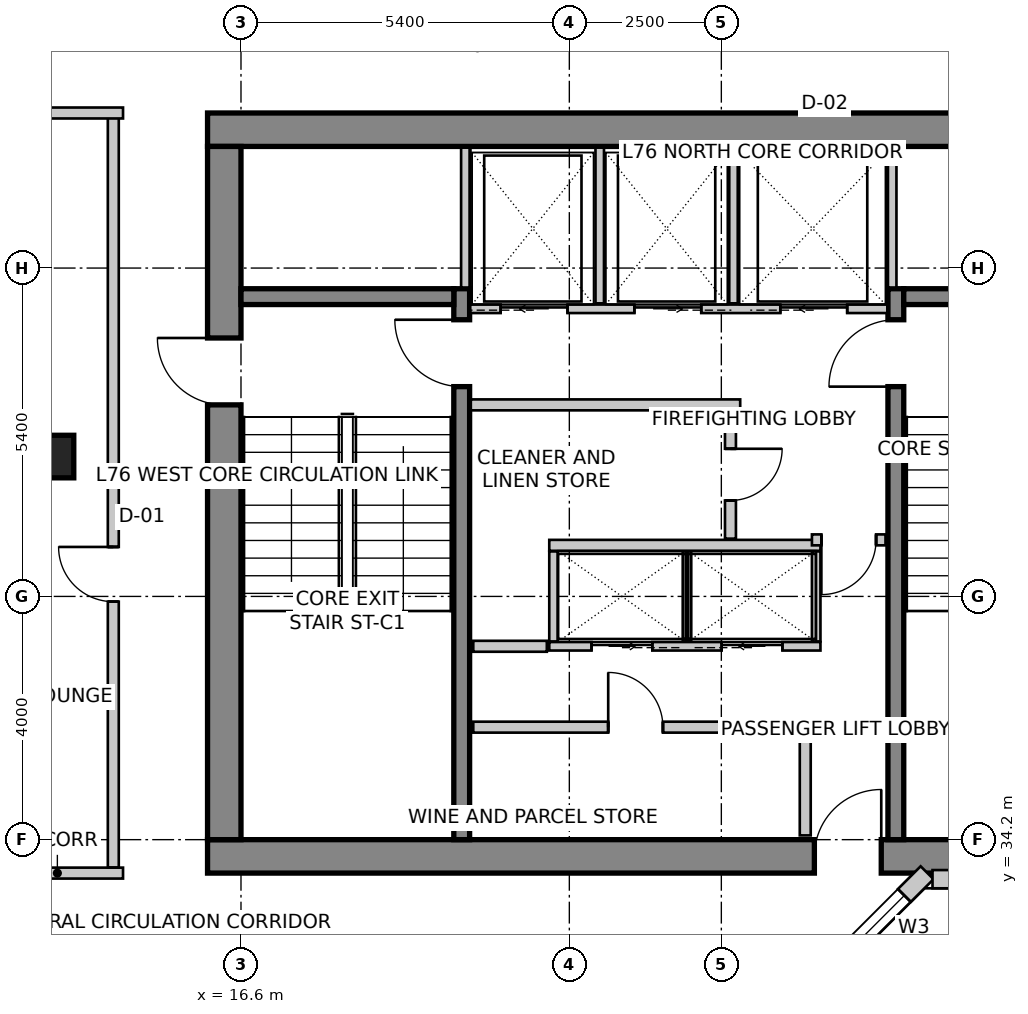
"""IFC4 building model, lengths in metres.
Left out: names, types, materials, properties, quantities, classifications, styles, units other than length and angle.
Written with IfcOpenShell. Run it as: python <this file> out.ifc"""

import sys

from ifc_helpers import new_model, si_unit, direction, frame, frame_2d, origin, origin_2d, place, context, subcontext, project, spatial, rectangle, extrude, source, transform, mapped, element, fill, save


model = new_model("IFC4")
c1 = context("Model", 3, precision=1e-05, world=origin(), true_north=direction((0.0, 1.0)))
c2 = subcontext(c1, "Body", "Model", "MODEL_VIEW")
j1 = project(units=[si_unit("LENGTHUNIT", "METRE"), si_unit("PLANEANGLEUNIT", "RADIAN")], contexts=[c1])
p1 = place(None, origin())
s1 = spatial("IfcSite", under=j1, at=p1, CompositionType="ELEMENT")
p2 = place(p1, origin())
s2 = spatial("IfcBuilding", under=s1, at=p2, CompositionType="ELEMENT")
p3 = place(p2, frame((0.0, 0.0, 296.5)))
s3 = spatial("IfcBuildingStorey", under=s2, at=p3, CompositionType="ELEMENT", Elevation=296.5)
p4 = place(p3, frame((16.05, 45.875, 0.0), z_axis=(0.0, 0.0, 1.0), x_axis=(1.0, 0.0, 0.0)))
e1 = element("IfcWall", 1, at=p4, inside=s3, PredefinedType="SHEAR", context=c2, shape_type="SweptSolid", body=[
    extrude(rectangle(XDim=15.5, YDim=0.55, at=frame_2d((7.75, 0.0))), origin(), (0.0, 0.0, 1.0), 4.0),
])
p5 = place(p3, frame((16.05, 33.925, 0.0), z_axis=(0.0, 0.0, 1.0), x_axis=(1.0, 0.0, 0.0)))
e2 = element("IfcWall", 2, at=p5, inside=s3, PredefinedType="SHEAR", context=c2, shape_type="SweptSolid", body=[
    extrude(rectangle(XDim=15.5, YDim=0.55, at=frame_2d((7.75, 0.0))), origin(), (0.0, 0.0, 1.0), 4.0),
])
m1 = source(origin(), c2, "Body", "SweptSolid", [
    extrude(rectangle(XDim=1.1, YDim=2.15, at=frame_2d((0.55, 1.075))), frame((0.0, 0.285, 0.0), z_axis=(0.0, -1.0, 0.0), x_axis=(1.0, 0.0, 0.0)), (0.0, 0.0, 1.0), 0.57),
])
p6 = place(p5, frame((9.98, 0.0, 0.0)))
e3 = element("IfcOpeningElement", 3, at=p6, cuts=e2, PredefinedType="OPENING", context=c2, shape_type="MappedRepresentation", body=[
    mapped(m1, transform((0.0, 0.0, 0.0), scale=1.0)),
])
p7 = place(p3, frame((16.325, 34.2, 0.0), z_axis=(0.0, 0.0, 1.0), x_axis=(0.0, 1.0, 0.0)))
e4 = element("IfcWall", 4, at=p7, inside=s3, PredefinedType="SHEAR", context=c2, shape_type="SweptSolid", body=[
    extrude(rectangle(XDim=11.4, YDim=0.55, at=frame_2d((5.7, 0.0))), origin(), (0.0, 0.0, 1.0), 4.0),
])
p8 = place(p7, frame((7.15, 0.0, 0.0)))
e5 = element("IfcOpeningElement", 5, at=p8, cuts=e4, PredefinedType="OPENING", context=c2, shape_type="MappedRepresentation", body=[
    mapped(m1, transform((0.0, 0.0, 0.0), scale=1.0)),
])
p9 = place(p3, frame((20.23, 34.2, 0.0), z_axis=(0.0, 0.0, 1.0), x_axis=(0.0, 1.0, 0.0)))
e6 = element("IfcWall", 6, at=p9, inside=s3, PredefinedType="SHEAR", context=c2, shape_type="SweptSolid", body=[
    extrude(rectangle(XDim=9.06, YDim=0.26, at=frame_2d((4.53, 0.0))), origin(), (0.0, 0.0, 1.0), 4.0),
])
m2 = source(origin(), c2, "Body", "SweptSolid", [
    extrude(rectangle(XDim=1.1, YDim=2.15, at=frame_2d((0.55, 1.075))), frame((0.0, 0.14, 0.0), z_axis=(0.0, -1.0, 0.0), x_axis=(1.0, 0.0, 0.0)), (0.0, 0.0, 1.0), 0.28),
])
p10 = place(p9, frame((7.45, 0.0, 0.0)))
e7 = element("IfcOpeningElement", 7, at=p10, cuts=e6, PredefinedType="OPENING", context=c2, shape_type="MappedRepresentation", body=[
    mapped(m2, transform((0.0, 0.0, 0.0), scale=1.0)),
])
p11 = place(p3, frame((27.37, 34.2, 0.0), z_axis=(0.0, 0.0, 1.0), x_axis=(0.0, 1.0, 0.0)))
e8 = element("IfcWall", 8, at=p11, inside=s3, PredefinedType="SHEAR", context=c2, shape_type="SweptSolid", body=[
    extrude(rectangle(XDim=9.06, YDim=0.26, at=frame_2d((4.53, 0.0))), origin(), (0.0, 0.0, 1.0), 4.0),
])
p12 = place(p11, frame((7.45, 0.0, 0.0)))
e9 = element("IfcOpeningElement", 9, at=p12, cuts=e8, PredefinedType="OPENING", context=c2, shape_type="MappedRepresentation", body=[
    mapped(m2, transform((0.0, 0.0, 0.0), scale=1.0)),
])
for number, where, z_axis, x_axis in (
    (10, (16.6, 43.13, 0.0), (0.0, 0.0, 1.0), (1.0, 0.0, 0.0)),
    (11, (27.5, 43.13, 0.0), (0.0, 0.0, 1.0), (1.0, 0.0, 0.0)),
):
    element("IfcWall", number, at=place(p3, frame(where, z_axis=z_axis, x_axis=x_axis)), inside=s3, PredefinedType="SHEAR", context=c2, shape_type="SweptSolid", body=[
        extrude(rectangle(XDim=3.5, YDim=0.26, at=frame_2d((1.75, 0.0))), origin(), (0.0, 0.0, 1.0), 4.0),
    ])
m3 = source(origin(), c2, "Body", "SweptSolid", [
    extrude(rectangle(XDim=0.7, YDim=0.7, at=origin_2d()), origin(), (0.0, 0.0, 1.0), 4.0),
])
p13 = place(p3, frame((13.5, 40.5, 0.0), z_axis=(0.0, 0.0, 1.0), x_axis=(1.0, 0.0, 0.0)))
e12 = element("IfcColumn", 12, at=p13, inside=s3, PredefinedType="COLUMN", context=c2, shape_type="MappedRepresentation", body=[
    mapped(m3, transform((0.0, 0.0, 0.0), scale=1.0)),
])
p14 = place(p3, frame((25.828, 31.6, 0.0), z_axis=(0.0, 0.0, 1.0), x_axis=(0.707106781187, 0.707106781187, 0.0)))
e13 = element("IfcWall", 13, at=p14, inside=s3, PredefinedType="SOLIDWALL", context=c2, shape_type="SweptSolid", body=[
    extrude(rectangle(XDim=2.907, YDim=0.3, at=frame_2d((1.454, 0.0))), origin(), (0.0, 0.0, 1.0), 3.75),
])
m4 = source(origin(), c2, "Body", "SweptSolid", [
    extrude(rectangle(XDim=1.5, YDim=1.8, at=frame_2d((0.75, 0.9))), frame((0.0, 0.16, 0.0), z_axis=(0.0, -1.0, 0.0), x_axis=(1.0, 0.0, 0.0)), (0.0, 0.0, 1.0), 0.32),
])
p15 = place(p14, frame((0.879, 0.0, 0.85)))
e14 = element("IfcOpeningElement", 14, at=p15, cuts=e13, PredefinedType="OPENING", context=c2, shape_type="MappedRepresentation", body=[
    mapped(m4, transform((0.0, 0.0, 0.0), scale=1.0)),
])
p16 = place(p3, frame((27.973, 33.55, 0.0), z_axis=(0.0, 0.0, 1.0), x_axis=(1.0, 0.0, 0.0)))
e15 = element("IfcWall", 15, at=p16, inside=s3, PredefinedType="SOLIDWALL", context=c2, shape_type="SweptSolid", body=[
    extrude(rectangle(XDim=9.115, YDim=0.3, at=frame_2d((4.558, 0.0))), origin(), (0.0, 0.0, 1.0), 3.75),
])
m5 = source(origin(), c2, "Body", "SweptSolid", [
    extrude(rectangle(XDim=2.8, YDim=2.4, at=frame_2d((1.4, 1.2))), frame((0.0, 0.16, 0.0), z_axis=(0.0, -1.0, 0.0), x_axis=(1.0, 0.0, 0.0)), (0.0, 0.0, 1.0), 0.32),
])
p17 = place(p16, frame((1.039, 0.0, 0.85)))
e16 = element("IfcOpeningElement", 16, at=p17, cuts=e15, PredefinedType="OPENING", context=c2, shape_type="MappedRepresentation", body=[
    mapped(m5, transform((0.0, 0.0, 0.0), scale=1.0)),
])
m6 = source(origin(), c2, "Body", "SweptSolid", [
    extrude(rectangle(XDim=2.4, YDim=2.2, at=frame_2d((1.2, 1.1))), frame((0.0, 0.16, 0.0), z_axis=(0.0, -1.0, 0.0), x_axis=(1.0, 0.0, 0.0)), (0.0, 0.0, 1.0), 0.32),
])
p18 = place(p16, frame((5.476, 0.0, 0.85)))
e17 = element("IfcOpeningElement", 17, at=p18, cuts=e15, PredefinedType="OPENING", context=c2, shape_type="MappedRepresentation", body=[
    mapped(m6, transform((0.0, 0.0, 0.0), scale=1.0)),
])
p19 = place(p3, frame((21.873, 52.741, 0.0), z_axis=(0.0, 0.0, 1.0), x_axis=(-0.843661487732, -0.536875492193, 0.0)))
e18 = element("IfcWall", 18, at=p19, inside=s3, PredefinedType="SOLIDWALL", context=c2, shape_type="SweptSolid", body=[
    extrude(rectangle(XDim=10.282, YDim=0.3, at=frame_2d((5.141, 0.0))), origin(), (0.0, 0.0, 1.0), 3.75),
])
p20 = place(p19, frame((1.26, 0.0, 0.85)))
e19 = element("IfcOpeningElement", 19, at=p20, cuts=e18, PredefinedType="OPENING", context=c2, shape_type="MappedRepresentation", body=[
    mapped(m6, transform((0.0, 0.0, 0.0), scale=1.0)),
])
p21 = place(p19, frame((5.339, 0.0, 0.85)))
e20 = element("IfcOpeningElement", 20, at=p21, cuts=e18, PredefinedType="OPENING", context=c2, shape_type="MappedRepresentation", body=[
    mapped(m5, transform((0.0, 0.0, 0.0), scale=1.0)),
])
p22 = place(p3, frame((20.37, 42.93, 0.0), z_axis=(0.0, 0.0, 1.0), x_axis=(1.0, 0.0, 0.0)))
e21 = element("IfcWall", 21, at=p22, inside=s3, PredefinedType="SOLIDWALL", context=c2, shape_type="SweptSolid", body=[
    extrude(rectangle(XDim=6.86, YDim=0.14, at=frame_2d((3.43, 0.0))), origin(), (0.0, 0.0, 1.0), 3.75),
])
m7 = source(origin(), c2, "Body", "SweptSolid", [
    extrude(rectangle(XDim=1.1, YDim=2.15, at=frame_2d((0.55, 1.075))), frame((0.0, 0.08, 0.0), z_axis=(0.0, -1.0, 0.0), x_axis=(1.0, 0.0, 0.0)), (0.0, 0.0, 1.0), 0.16),
])
p23 = place(p22, frame((0.5, 0.0, 0.0)))
e22 = element("IfcOpeningElement", 22, at=p23, cuts=e21, PredefinedType="OPENING", context=c2, shape_type="MappedRepresentation", body=[
    mapped(m7, transform((0.0, 0.0, 0.0), scale=1.0)),
])
p24 = place(p22, frame((2.7, 0.0, 0.0)))
e23 = element("IfcOpeningElement", 23, at=p24, cuts=e21, PredefinedType="OPENING", context=c2, shape_type="MappedRepresentation", body=[
    mapped(m7, transform((0.0, 0.0, 0.0), scale=1.0)),
])
p25 = place(p22, frame((5.1, 0.0, 0.0)))
e24 = element("IfcOpeningElement", 24, at=p25, cuts=e21, PredefinedType="OPENING", context=c2, shape_type="MappedRepresentation", body=[
    mapped(m7, transform((0.0, 0.0, 0.0), scale=1.0)),
])
for number, where, z_axis, x_axis in (
    (25, (20.29, 43.28, 0.0), (0.0, 0.0, 1.0), (0.0, 1.0, 0.0)),
    (26, (27.31, 43.28, 0.0), (0.0, 0.0, 1.0), (0.0, 1.0, 0.0)),
):
    element("IfcWall", number, at=place(p3, frame(where, z_axis=z_axis, x_axis=x_axis)), inside=s3, PredefinedType="SOLIDWALL", context=c2, shape_type="SweptSolid", body=[
        extrude(rectangle(XDim=2.3, YDim=0.14, at=frame_2d((1.15, 0.0))), origin(), (0.0, 0.0, 1.0), 3.75),
    ])
for number, where, z_axis, x_axis in (
    (27, (22.5, 43.02, 0.0), (0.0, 0.0, 1.0), (0.0, 1.0, 0.0)),
    (28, (24.7, 43.02, 0.0), (0.0, 0.0, 1.0), (0.0, 1.0, 0.0)),
):
    element("IfcWall", number, at=place(p3, frame(where, z_axis=z_axis, x_axis=x_axis)), inside=s3, PredefinedType="SOLIDWALL", context=c2, shape_type="SweptSolid", body=[
        extrude(rectangle(XDim=2.56, YDim=0.14, at=frame_2d((1.28, 0.0))), origin(), (0.0, 0.0, 1.0), 3.75),
    ])
p26 = place(p3, frame((21.67, 37.38, 0.0), z_axis=(0.0, 0.0, 1.0), x_axis=(1.0, 0.0, 0.0)))
e29 = element("IfcWall", 29, at=p26, inside=s3, PredefinedType="SOLIDWALL", context=c2, shape_type="SweptSolid", body=[
    extrude(rectangle(XDim=4.46, YDim=0.14, at=frame_2d((2.23, 0.0))), origin(), (0.0, 0.0, 1.0), 3.75),
])
m8 = source(origin(), c2, "Body", "SweptSolid", [
    extrude(rectangle(XDim=1.0, YDim=2.15, at=frame_2d((0.5, 1.075))), frame((0.0, 0.08, 0.0), z_axis=(0.0, -1.0, 0.0), x_axis=(1.0, 0.0, 0.0)), (0.0, 0.0, 1.0), 0.16),
])
p27 = place(p26, frame((0.695, 0.0, 0.0)))
e30 = element("IfcOpeningElement", 30, at=p27, cuts=e29, PredefinedType="OPENING", context=c2, shape_type="MappedRepresentation", body=[
    mapped(m8, transform((0.0, 0.0, 0.0), scale=1.0)),
])
p28 = place(p26, frame((2.835, 0.0, 0.0)))
e31 = element("IfcOpeningElement", 31, at=p28, cuts=e29, PredefinedType="OPENING", context=c2, shape_type="MappedRepresentation", body=[
    mapped(m8, transform((0.0, 0.0, 0.0), scale=1.0)),
])
p29 = place(p3, frame((21.67, 39.04, 0.0), z_axis=(0.0, 0.0, 1.0), x_axis=(1.0, 0.0, 0.0)))
e32 = element("IfcWall", 32, at=p29, inside=s3, PredefinedType="SOLIDWALL", context=c2, shape_type="SweptSolid", body=[
    extrude(rectangle(XDim=4.46, YDim=0.18, at=frame_2d((2.23, 0.0))), origin(), (0.0, 0.0, 1.0), 3.75),
])
for number, where, z_axis, x_axis in (
    (33, (26.06, 37.46, 0.0), (0.0, 0.0, 1.0), (0.0, 1.0, 0.0)),
    (34, (21.74, 37.46, 0.0), (0.0, 0.0, 1.0), (0.0, 1.0, 0.0)),
    (35, (23.935, 37.46, 0.0), (0.0, 0.0, 1.0), (0.0, 1.0, 0.0)),
):
    element("IfcWall", number, at=place(p3, frame(where, z_axis=z_axis, x_axis=x_axis)), inside=s3, PredefinedType="SOLIDWALL", context=c2, shape_type="SweptSolid", body=[
        extrude(rectangle(XDim=1.48, YDim=0.14, at=frame_2d((0.74, 0.0))), origin(), (0.0, 0.0, 1.0), 3.75),
    ])
p30 = place(p3, frame((24.81, 41.35, 0.0), z_axis=(0.0, 0.0, 1.0), x_axis=(-1.0, 0.0, 0.0)))
e36 = element("IfcWall", 36, at=p30, inside=s3, PredefinedType="PARTITIONING", context=c2, shape_type="SweptSolid", body=[
    extrude(rectangle(XDim=4.43, YDim=0.18, at=frame_2d((2.215, 0.0))), origin(), (0.0, 0.0, 1.0), 3.75),
])
p31 = place(p3, frame((24.65, 41.256, 0.0), z_axis=(0.0, 0.0, 1.0), x_axis=(0.0, -1.0, 0.0)))
e37 = element("IfcWall", 37, at=p31, inside=s3, PredefinedType="PARTITIONING", context=c2, shape_type="SweptSolid", body=[
    extrude(rectangle(XDim=2.106, YDim=0.18, at=frame_2d((1.053, 0.0))), origin(), (0.0, 0.0, 1.0), 3.75),
])
m9 = source(origin(), c2, "Body", "SweptSolid", [
    extrude(rectangle(XDim=0.85, YDim=2.15, at=frame_2d((0.425, 1.075))), frame((0.0, 0.1, 0.0), z_axis=(0.0, -1.0, 0.0), x_axis=(1.0, 0.0, 0.0)), (0.0, 0.0, 1.0), 0.2),
])
p32 = place(p31, frame((0.628, 0.0, 0.0)))
e38 = element("IfcOpeningElement", 38, at=p32, cuts=e37, PredefinedType="OPENING", context=c2, shape_type="MappedRepresentation", body=[
    mapped(m9, transform((0.0, 0.0, 0.0), scale=1.0)),
])
p33 = place(p3, frame((21.63, 37.38, 0.0), z_axis=(0.0, 0.0, 1.0), x_axis=(-1.0, 0.0, 0.0)))
e39 = element("IfcWall", 39, at=p33, inside=s3, PredefinedType="PARTITIONING", context=c2, shape_type="SweptSolid", body=[
    extrude(rectangle(XDim=1.21, YDim=0.18, at=frame_2d((0.605, 0.0))), origin(), (0.0, 0.0, 1.0), 3.75),
])
p34 = place(p3, frame((27.2, 39.13, 0.0), z_axis=(0.0, 0.0, 1.0), x_axis=(-1.0, 0.0, 0.0)))
e40 = element("IfcWall", 40, at=p34, inside=s3, PredefinedType="PARTITIONING", context=c2, shape_type="SweptSolid", body=[
    extrude(rectangle(XDim=1.21, YDim=0.18, at=frame_2d((0.605, 0.0))), origin(), (0.0, 0.0, 1.0), 3.75),
])
m10 = source(origin(), c2, "Body", "SweptSolid", [
    extrude(rectangle(XDim=0.9, YDim=2.15, at=frame_2d((0.45, 1.075))), frame((0.0, 0.1, 0.0), z_axis=(0.0, -1.0, 0.0), x_axis=(1.0, 0.0, 0.0)), (0.0, 0.0, 1.0), 0.2),
])
p35 = place(p34, frame((0.155, 0.0, 0.0)))
e41 = element("IfcOpeningElement", 41, at=p35, cuts=e40, PredefinedType="OPENING", context=c2, shape_type="MappedRepresentation", body=[
    mapped(m10, transform((0.0, 0.0, 0.0), scale=1.0)),
])
p36 = place(p3, frame((20.42, 36.05, 0.0), z_axis=(0.0, 0.0, 1.0), x_axis=(1.0, 0.0, 0.0)))
e42 = element("IfcWall", 42, at=p36, inside=s3, PredefinedType="PARTITIONING", context=c2, shape_type="SweptSolid", body=[
    extrude(rectangle(XDim=5.46, YDim=0.18, at=frame_2d((2.73, 0.0))), origin(), (0.0, 0.0, 1.0), 3.75),
])
p37 = place(p36, frame((2.219, 0.0, 0.0)))
e43 = element("IfcOpeningElement", 43, at=p37, cuts=e42, PredefinedType="OPENING", context=c2, shape_type="MappedRepresentation", body=[
    mapped(m10, transform((0.0, 0.0, 0.0), scale=1.0)),
])
p38 = place(p3, frame((25.88, 35.956, 0.0), z_axis=(0.0, 0.0, 1.0), x_axis=(0.0, -1.0, 0.0)))
e44 = element("IfcWall", 44, at=p38, inside=s3, PredefinedType="PARTITIONING", context=c2, shape_type="SweptSolid", body=[
    extrude(rectangle(XDim=1.686, YDim=0.18, at=frame_2d((0.843, 0.0))), origin(), (0.0, 0.0, 1.0), 3.042),
])
p39 = place(p3, frame((12.5, 33.65, 0.0), z_axis=(0.0, 0.0, 1.0), x_axis=(1.0, 0.0, 0.0)))
e45 = element("IfcWall", 45, at=p39, inside=s3, PredefinedType="PARTITIONING", context=c2, shape_type="SweptSolid", body=[
    extrude(rectangle(XDim=2.16, YDim=0.18, at=frame_2d((1.08, 0.0))), origin(), (0.0, 0.0, 1.0), 3.75),
])
p40 = place(p3, frame((14.5, 33.744, 0.0), z_axis=(0.0, 0.0, 1.0), x_axis=(0.0, 1.0, 0.0)))
e46 = element("IfcWall", 46, at=p40, inside=s3, PredefinedType="PARTITIONING", context=c2, shape_type="SweptSolid", body=[
    extrude(rectangle(XDim=12.406, YDim=0.18, at=frame_2d((6.203, 0.0))), origin(), (0.0, 0.0, 1.0), 3.75),
])
p41 = place(p40, frame((4.37, 0.0, 0.0)))
e47 = element("IfcOpeningElement", 47, at=p41, cuts=e46, PredefinedType="OPENING", context=c2, shape_type="MappedRepresentation", body=[
    mapped(m10, transform((0.0, 0.0, 0.0), scale=1.0)),
])
p42 = place(p3, frame((14.66, 46.15, 0.0), z_axis=(0.0, 0.0, 1.0), x_axis=(-1.0, 0.0, 0.0)))
e48 = element("IfcWall", 48, at=p42, inside=s3, PredefinedType="PARTITIONING", context=c2, shape_type="SweptSolid", body=[
    extrude(rectangle(XDim=1.602, YDim=0.18, at=frame_2d((0.801, 0.0))), origin(), (0.0, 0.0, 1.0), 3.75),
])
m11 = source(origin(), c2, "Body", "SweptSolid", [
    extrude(rectangle(XDim=1.5, YDim=1.8, at=frame_2d((0.75, 0.9))), frame((0.0, -0.015, 0.0), z_axis=(0.0, -1.0, 0.0), x_axis=(1.0, 0.0, 0.0)), (0.0, 0.0, 1.0), 0.06),
])
p43 = place(p15, origin())
e49 = element("IfcWindow", 49, at=p43, inside=s3, PartitioningType="SINGLE_PANEL", PredefinedType="WINDOW", context=c2, shape_type="MappedRepresentation", body=[
    mapped(m11, transform((0.0, 0.0, 0.0), scale=1.0)),
])
fill(e14, e49)
m12 = source(origin(), c2, "Body", "SweptSolid", [
    extrude(rectangle(XDim=1.1, YDim=2.15, at=frame_2d((0.55, 1.075))), frame((0.0, 0.025, 0.0), z_axis=(0.0, -1.0, 0.0), x_axis=(1.0, 0.0, 0.0)), (0.0, 0.0, 1.0), 0.05),
])
p44 = place(p23, origin())
e50 = element("IfcDoor", 50, at=p44, inside=s3, OperationType="SLIDING_TO_LEFT", PredefinedType="DOOR", context=c2, shape_type="MappedRepresentation", body=[
    mapped(m12, transform((0.0, 0.0, 0.0), scale=1.0)),
])
fill(e22, e50)
p45 = place(p24, origin())
e51 = element("IfcDoor", 51, at=p45, inside=s3, OperationType="SLIDING_TO_RIGHT", PredefinedType="DOOR", context=c2, shape_type="MappedRepresentation", body=[
    mapped(m12, transform((0.0, 0.0, 0.0), scale=1.0)),
])
fill(e23, e51)
m13 = source(origin(), c2, "Body", "SweptSolid", [
    extrude(rectangle(XDim=1.1, YDim=2.15, at=frame_2d((0.55, 1.075))), frame((0.0, 0.025, 0.0), z_axis=(0.0, -1.0, 0.0), x_axis=(1.0, 0.0, 0.0)), (0.0, 0.0, 1.0), 0.05),
])
p46 = place(p25, origin())
e52 = element("IfcDoor", 52, at=p46, inside=s3, OperationType="SLIDING_TO_LEFT", PredefinedType="DOOR", context=c2, shape_type="MappedRepresentation", body=[
    mapped(m13, transform((0.0, 0.0, 0.0), scale=1.0)),
])
fill(e24, e52)
m14 = source(origin(), c2, "Body", "SweptSolid", [
    extrude(rectangle(XDim=1.0, YDim=2.15, at=frame_2d((0.5, 1.075))), frame((0.0, 0.025, 0.0), z_axis=(0.0, -1.0, 0.0), x_axis=(1.0, 0.0, 0.0)), (0.0, 0.0, 1.0), 0.05),
])
p47 = place(p27, origin())
e53 = element("IfcDoor", 53, at=p47, inside=s3, OperationType="SLIDING_TO_RIGHT", PredefinedType="DOOR", context=c2, shape_type="MappedRepresentation", body=[
    mapped(m14, transform((0.0, 0.0, 0.0), scale=1.0)),
])
fill(e30, e53)
p48 = place(p28, origin())
e54 = element("IfcDoor", 54, at=p48, inside=s3, OperationType="SLIDING_TO_LEFT", PredefinedType="DOOR", context=c2, shape_type="MappedRepresentation", body=[
    mapped(m14, transform((0.0, 0.0, 0.0), scale=1.0)),
])
fill(e31, e54)
m15 = source(origin(), c2, "Body", "SweptSolid", [
    extrude(rectangle(XDim=1.1, YDim=2.15, at=frame_2d((0.55, 1.075))), frame((0.0, 0.025, 0.0), z_axis=(0.0, -1.0, 0.0), x_axis=(1.0, 0.0, 0.0)), (0.0, 0.0, 1.0), 0.05),
])
p49 = place(p10, origin())
e55 = element("IfcDoor", 55, at=p49, inside=s3, OperationType="SINGLE_SWING_RIGHT", PredefinedType="DOOR", context=c2, shape_type="MappedRepresentation", body=[
    mapped(m15, transform((0.0, 0.0, 0.0), scale=1.0)),
])
fill(e7, e55)
p50 = place(p12, origin())
e56 = element("IfcDoor", 56, at=p50, inside=s3, OperationType="SINGLE_SWING_LEFT", PredefinedType="DOOR", context=c2, shape_type="MappedRepresentation", body=[
    mapped(m15, transform((0.0, 0.0, 0.0), scale=1.0)),
])
fill(e9, e56)
p51 = place(p8, origin())
e57 = element("IfcDoor", 57, at=p51, inside=s3, OperationType="SINGLE_SWING_RIGHT", PredefinedType="DOOR", context=c2, shape_type="MappedRepresentation", body=[
    mapped(m15, transform((0.0, 0.0, 0.0), scale=1.0)),
])
fill(e5, e57)
p52 = place(p6, origin())
e58 = element("IfcDoor", 58, at=p52, inside=s3, OperationType="SINGLE_SWING_RIGHT", PredefinedType="DOOR", context=c2, shape_type="MappedRepresentation", body=[
    mapped(m15, transform((0.0, 0.0, 0.0), scale=1.0)),
])
fill(e3, e58)
m16 = source(origin(), c2, "Body", "SweptSolid", [
    extrude(rectangle(XDim=0.85, YDim=2.15, at=frame_2d((0.425, 1.075))), frame((0.0, 0.025, 0.0), z_axis=(0.0, -1.0, 0.0), x_axis=(1.0, 0.0, 0.0)), (0.0, 0.0, 1.0), 0.05),
])
p53 = place(p32, origin())
e59 = element("IfcDoor", 59, at=p53, inside=s3, OperationType="SINGLE_SWING_LEFT", PredefinedType="DOOR", context=c2, shape_type="MappedRepresentation", body=[
    mapped(m16, transform((0.0, 0.0, 0.0), scale=1.0)),
])
fill(e38, e59)
m17 = source(origin(), c2, "Body", "SweptSolid", [
    extrude(rectangle(XDim=0.9, YDim=2.15, at=frame_2d((0.45, 1.075))), frame((0.0, 0.025, 0.0), z_axis=(0.0, -1.0, 0.0), x_axis=(1.0, 0.0, 0.0)), (0.0, 0.0, 1.0), 0.05),
])
p54 = place(p35, origin())
e60 = element("IfcDoor", 60, at=p54, inside=s3, OperationType="SINGLE_SWING_RIGHT", PredefinedType="DOOR", context=c2, shape_type="MappedRepresentation", body=[
    mapped(m17, transform((0.0, 0.0, 0.0), scale=1.0)),
])
fill(e41, e60)
p55 = place(p37, origin())
e61 = element("IfcDoor", 61, at=p55, inside=s3, OperationType="SINGLE_SWING_LEFT", PredefinedType="DOOR", context=c2, shape_type="MappedRepresentation", body=[
    mapped(m17, transform((0.0, 0.0, 0.0), scale=1.0)),
])
fill(e43, e61)
m18 = source(origin(), c2, "Body", "SweptSolid", [
    extrude(rectangle(XDim=0.9, YDim=2.15, at=frame_2d((0.45, 1.075))), frame((0.0, 0.025, 0.0), z_axis=(0.0, -1.0, 0.0), x_axis=(1.0, 0.0, 0.0)), (0.0, 0.0, 1.0), 0.05),
])
p56 = place(p41, origin())
e62 = element("IfcDoor", 62, at=p56, inside=s3, OperationType="SINGLE_SWING_RIGHT", PredefinedType="DOOR", context=c2, shape_type="MappedRepresentation", body=[
    mapped(m18, transform((0.0, 0.0, 0.0), scale=1.0)),
])
fill(e47, e62)
save(model, sys.argv[1])
